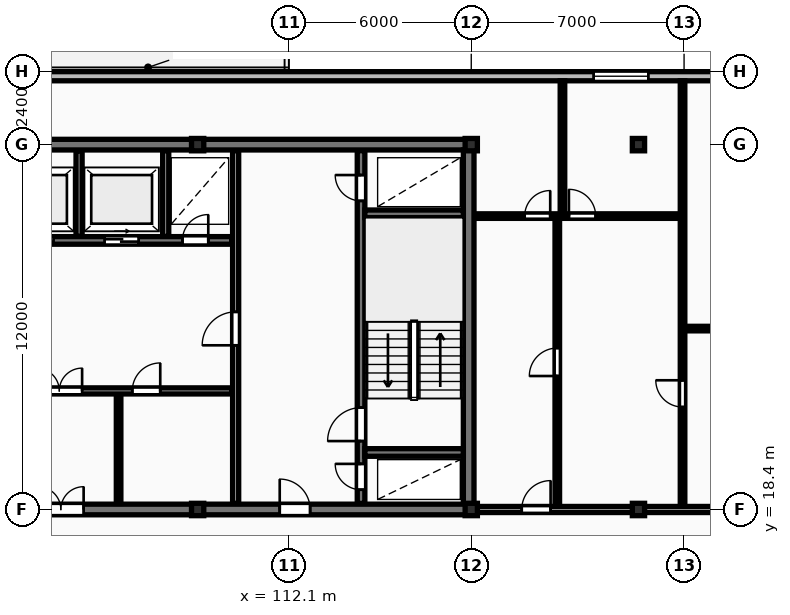
"""IFC4 building model, lengths in metres.
Left out: names, types, materials, properties, quantities, classifications, styles, units other than length and angle.
Written with IfcOpenShell. Run it as: python <this file> out.ifc"""

import sys

from ifc_helpers import new_model, si_unit, direction, frame, frame_2d, origin, origin_2d, place, context, subcontext, project, spatial, rectangle, i_section, extrude, element, fill, save


model = new_model("IFC4")
c1 = context("Model", 3, precision=1e-05, world=origin(), true_north=direction((0.0, 1.0)))
c2 = subcontext(c1, "Body", "Model", "MODEL_VIEW")
j1 = project(units=[si_unit("LENGTHUNIT", "METRE"), si_unit("PLANEANGLEUNIT", "RADIAN")], contexts=[c1])
p1 = place(None, origin())
s1 = spatial("IfcSite", under=j1, at=p1, CompositionType="ELEMENT")
p2 = place(p1, origin())
s2 = spatial("IfcBuilding", under=s1, at=p2, CompositionType="ELEMENT")
p3 = place(p2, frame((0.0, 0.0, 153.7)))
s3 = spatial("IfcBuildingStorey", under=s2, at=p3, CompositionType="ELEMENT", Elevation=153.7)
for number, where, z_axis, x_axis in (
    (1, (109.1, 18.4, 0.0), (0.0, 0.0, 1.0), (1.0, 0.0, 0.0)),
    (2, (109.1, 30.4, 0.0), (0.0, 0.0, 1.0), (1.0, 0.0, 0.0)),
    (3, (118.1, 18.4, 0.0), (0.0, 0.0, 1.0), (1.0, 0.0, 0.0)),
    (4, (118.1, 30.4, 0.0), (0.0, 0.0, 1.0), (1.0, 0.0, 0.0)),
    (5, (123.6, 18.4, 0.0), (0.0, 0.0, 1.0), (1.0, 0.0, 0.0)),
    (6, (123.6, 30.4, 0.0), (0.0, 0.0, 1.0), (1.0, 0.0, 0.0)),
):
    element("IfcColumn", number, at=place(p3, frame(where, z_axis=z_axis, x_axis=x_axis)), inside=s3, PredefinedType="COLUMN", context=c2, shape_type="SweptSolid", body=[
        extrude(i_section(OverallWidth=0.403, OverallDepth=0.406, WebThickness=0.027, FlangeThickness=0.043, FilletRadius=0.015, at=origin_2d()), origin(), (0.0, 0.0, 1.0), 3.6),
    ])
p4 = place(p3, frame((130.7, 32.65, 0.0), z_axis=(0.0, 0.0, 1.0), x_axis=(-1.0, 0.0, 0.0)))
e7 = element("IfcWall", 7, at=p4, inside=s3, PredefinedType="STANDARD", context=c2, shape_type="SweptSolid", body=[
    extrude(rectangle(XDim=58.0, YDim=0.3, at=frame_2d((29.0, 0.0))), origin(), (0.0, 0.0, 1.0), 3.32),
])
p5 = place(p4, frame((50.125, 0.0, 0.85)))
e8 = element("IfcOpeningElement", 8, at=p5, cuts=e7, PredefinedType="OPENING", context=c2, shape_type="SweptSolid", body=[
    extrude(rectangle(XDim=1.8, YDim=1.8, at=frame_2d((0.9, 0.9))), frame((0.0, 0.16, 0.0), z_axis=(0.0, -1.0, 0.0), x_axis=(1.0, 0.0, 0.0)), (0.0, 0.0, 1.0), 0.32),
])
p6 = place(p4, frame((6.775, 0.0, 0.85)))
e9 = element("IfcOpeningElement", 9, at=p6, cuts=e7, PredefinedType="OPENING", context=c2, shape_type="SweptSolid", body=[
    extrude(rectangle(XDim=1.8, YDim=1.8, at=frame_2d((0.9, 0.9))), frame((0.0, 0.16, 0.0), z_axis=(0.0, -1.0, 0.0), x_axis=(1.0, 0.0, 0.0)), (0.0, 0.0, 1.0), 0.32),
])
p7 = place(p4, frame((38.0, 0.0, 0.0)))
e10 = element("IfcOpeningElement", 10, at=p7, cuts=e7, PredefinedType="OPENING", context=c2, shape_type="SweptSolid", body=[
    extrude(rectangle(XDim=1.1, YDim=2.1, at=frame_2d((0.55, 1.05))), frame((0.0, 0.16, 0.0), z_axis=(0.0, -1.0, 0.0), x_axis=(1.0, 0.0, 0.0)), (0.0, 0.0, 1.0), 0.32),
])
p8 = place(p3, frame((81.925, 30.4, 0.0), z_axis=(0.0, 0.0, 1.0), x_axis=(1.0, 0.0, 0.0)))
e11 = element("IfcWall", 11, at=p8, inside=s3, PredefinedType="SHEAR", context=c2, shape_type="SweptSolid", body=[
    extrude(rectangle(XDim=36.265, YDim=0.35, at=frame_2d((18.132, 0.0))), origin(), (0.0, 0.0, 1.0), 3.6),
])
p9 = place(p8, frame((9.675, 0.0, 0.0)))
e12 = element("IfcOpeningElement", 12, at=p9, cuts=e11, PredefinedType="OPENING", context=c2, shape_type="SweptSolid", body=[
    extrude(rectangle(XDim=1.1, YDim=2.1, at=frame_2d((0.55, 1.05))), frame((0.0, 0.185, 0.0), z_axis=(0.0, -1.0, 0.0), x_axis=(1.0, 0.0, 0.0)), (0.0, 0.0, 1.0), 0.37),
])
p10 = place(p3, frame((118.015, 18.575, 0.0), z_axis=(0.0, 0.0, 1.0), x_axis=(0.0, 1.0, 0.0)))
e13 = element("IfcWall", 13, at=p10, inside=s3, PredefinedType="SHEAR", context=c2, shape_type="SweptSolid", body=[
    extrude(rectangle(XDim=11.65, YDim=0.35, at=frame_2d((5.825, 0.0))), origin(), (0.0, 0.0, 1.0), 3.6),
])
p11 = place(p3, frame((81.925, 18.4, 0.0), z_axis=(0.0, 0.0, 1.0), x_axis=(1.0, 0.0, 0.0)))
e14 = element("IfcWall", 14, at=p11, inside=s3, PredefinedType="SHEAR", context=c2, shape_type="SweptSolid", body=[
    extrude(rectangle(XDim=36.265, YDim=0.35, at=frame_2d((18.132, 0.0))), origin(), (0.0, 0.0, 1.0), 3.6),
])
p12 = place(p11, frame((5.675, 0.0, 0.0)))
e15 = element("IfcOpeningElement", 15, at=p12, cuts=e14, PredefinedType="OPENING", context=c2, shape_type="SweptSolid", body=[
    extrude(rectangle(XDim=1.0, YDim=2.15, at=frame_2d((0.5, 1.075))), frame((0.0, 0.185, 0.0), z_axis=(0.0, -1.0, 0.0), x_axis=(1.0, 0.0, 0.0)), (0.0, 0.0, 1.0), 0.37),
])
p13 = place(p11, frame((21.925, 0.0, 0.0)))
e16 = element("IfcOpeningElement", 16, at=p13, cuts=e14, PredefinedType="OPENING", context=c2, shape_type="SweptSolid", body=[
    extrude(rectangle(XDim=1.5, YDim=2.2, at=frame_2d((0.75, 1.1))), frame((0.0, 0.185, 0.0), z_axis=(0.0, -1.0, 0.0), x_axis=(1.0, 0.0, 0.0)), (0.0, 0.0, 1.0), 0.37),
])
p14 = place(p11, frame((29.875, 0.0, 0.0)))
e17 = element("IfcOpeningElement", 17, at=p14, cuts=e14, PredefinedType="OPENING", context=c2, shape_type="SweptSolid", body=[
    extrude(rectangle(XDim=1.0, YDim=2.15, at=frame_2d((0.5, 1.075))), frame((0.0, 0.185, 0.0), z_axis=(0.0, -1.0, 0.0), x_axis=(1.0, 0.0, 0.0)), (0.0, 0.0, 1.0), 0.37),
])
for number, where, z_axis, x_axis in (
    (18, (105.2, 27.38, 0.0), (0.0, 0.0, 1.0), (0.0, 1.0, 0.0)),
    (19, (108.05, 27.38, 0.0), (0.0, 0.0, 1.0), (0.0, 1.0, 0.0)),
):
    element("IfcWall", number, at=place(p3, frame(where, z_axis=z_axis, x_axis=x_axis)), inside=s3, PredefinedType="PARTITIONING", context=c2, shape_type="SweptSolid", body=[
        extrude(rectangle(XDim=2.82, YDim=0.2, at=frame_2d((1.41, 0.0))), origin(), (0.0, 0.0, 1.0), 3.32),
    ])
p15 = place(p3, frame((99.68, 27.25, 0.0), z_axis=(0.0, 0.0, 1.0), x_axis=(1.0, 0.0, 0.0)))
e20 = element("IfcWall", 20, at=p15, inside=s3, PredefinedType="SHEAR", context=c2, shape_type="SweptSolid", body=[
    extrude(rectangle(XDim=10.54, YDim=0.25, at=frame_2d((5.27, 0.0))), origin(), (0.0, 0.0, 1.0), 3.6),
])
p16 = place(p15, frame((0.76, 0.0, 0.0)))
e21 = element("IfcOpeningElement", 21, at=p16, cuts=e20, PredefinedType="OPENING", context=c2, shape_type="SweptSolid", body=[
    extrude(rectangle(XDim=1.12, YDim=2.12, at=frame_2d((0.56, 1.06))), frame((0.0, 0.135, 0.0), z_axis=(0.0, -1.0, 0.0), x_axis=(1.0, 0.0, 0.0)), (0.0, 0.0, 1.0), 0.27),
])
p17 = place(p15, frame((3.56, 0.0, 0.0)))
e22 = element("IfcOpeningElement", 22, at=p17, cuts=e20, PredefinedType="OPENING", context=c2, shape_type="SweptSolid", body=[
    extrude(rectangle(XDim=1.12, YDim=2.12, at=frame_2d((0.56, 1.06))), frame((0.0, 0.135, 0.0), z_axis=(0.0, -1.0, 0.0), x_axis=(1.0, 0.0, 0.0)), (0.0, 0.0, 1.0), 0.27),
])
p18 = place(p15, frame((6.36, 0.0, 0.0)))
e23 = element("IfcOpeningElement", 23, at=p18, cuts=e20, PredefinedType="OPENING", context=c2, shape_type="SweptSolid", body=[
    extrude(rectangle(XDim=1.12, YDim=2.12, at=frame_2d((0.56, 1.06))), frame((0.0, 0.135, 0.0), z_axis=(0.0, -1.0, 0.0), x_axis=(1.0, 0.0, 0.0)), (0.0, 0.0, 1.0), 0.27),
])
p19 = place(p15, frame((8.92, 0.0, 0.0)))
e24 = element("IfcOpeningElement", 24, at=p19, cuts=e20, PredefinedType="OPENING", context=c2, shape_type="SweptSolid", body=[
    extrude(rectangle(XDim=0.85, YDim=2.05, at=frame_2d((0.425, 1.025))), frame((0.0, 0.135, 0.0), z_axis=(0.0, -1.0, 0.0), x_axis=(1.0, 0.0, 0.0)), (0.0, 0.0, 1.0), 0.27),
])
p20 = place(p3, frame((106.5, 18.6, 0.0), z_axis=(0.0, 0.0, 1.0), x_axis=(0.0, 1.0, 0.0)))
e25 = element("IfcWall", 25, at=p20, inside=s3, PredefinedType="PARTITIONING", context=c2, shape_type="SweptSolid", body=[
    extrude(rectangle(XDim=3.6, YDim=0.15, at=frame_2d((1.8, 0.0))), origin(), (0.0, 0.0, 1.0), 3.32),
])
p21 = place(p3, frame((91.08, 22.3, 0.0), z_axis=(0.0, 0.0, 1.0), x_axis=(1.0, 0.0, 0.0)))
e26 = element("IfcWall", 26, at=p21, inside=s3, PredefinedType="PARTITIONING", context=c2, shape_type="SweptSolid", body=[
    extrude(rectangle(XDim=19.14, YDim=0.2, at=frame_2d((9.57, 0.0))), origin(), (0.0, 0.0, 1.0), 3.32),
])
p22 = place(p21, frame((1.15, 0.0, 0.0)))
e27 = element("IfcOpeningElement", 27, at=p22, cuts=e26, PredefinedType="OPENING", context=c2, shape_type="SweptSolid", body=[
    extrude(rectangle(XDim=0.85, YDim=2.05, at=frame_2d((0.425, 1.025))), frame((0.0, 0.11, 0.0), z_axis=(0.0, -1.0, 0.0), x_axis=(1.0, 0.0, 0.0)), (0.0, 0.0, 1.0), 0.22),
])
p23 = place(p21, frame((3.2, 0.0, 0.0)))
e28 = element("IfcOpeningElement", 28, at=p23, cuts=e26, PredefinedType="OPENING", context=c2, shape_type="SweptSolid", body=[
    extrude(rectangle(XDim=0.85, YDim=2.05, at=frame_2d((0.425, 1.025))), frame((0.0, 0.11, 0.0), z_axis=(0.0, -1.0, 0.0), x_axis=(1.0, 0.0, 0.0)), (0.0, 0.0, 1.0), 0.22),
])
p24 = place(p21, frame((12.72, 0.0, 0.0)))
e29 = element("IfcOpeningElement", 29, at=p24, cuts=e26, PredefinedType="OPENING", context=c2, shape_type="SweptSolid", body=[
    extrude(rectangle(XDim=1.5, YDim=2.2, at=frame_2d((0.75, 1.1))), frame((0.0, 0.11, 0.0), z_axis=(0.0, -1.0, 0.0), x_axis=(1.0, 0.0, 0.0)), (0.0, 0.0, 1.0), 0.22),
])
p25 = place(p21, frame((6.42, 0.0, 0.0)))
e30 = element("IfcOpeningElement", 30, at=p25, cuts=e26, PredefinedType="OPENING", context=c2, shape_type="SweptSolid", body=[
    extrude(rectangle(XDim=0.92, YDim=2.08, at=frame_2d((0.46, 1.04))), frame((0.0, 0.11, 0.0), z_axis=(0.0, -1.0, 0.0), x_axis=(1.0, 0.0, 0.0)), (0.0, 0.0, 1.0), 0.22),
])
p26 = place(p21, frame((15.87, 0.0, 0.0)))
e31 = element("IfcOpeningElement", 31, at=p26, cuts=e26, PredefinedType="OPENING", context=c2, shape_type="SweptSolid", body=[
    extrude(rectangle(XDim=0.92, YDim=2.08, at=frame_2d((0.46, 1.04))), frame((0.0, 0.11, 0.0), z_axis=(0.0, -1.0, 0.0), x_axis=(1.0, 0.0, 0.0)), (0.0, 0.0, 1.0), 0.22),
])
p27 = place(p3, frame((110.35, 18.6, 0.0), z_axis=(0.0, 0.0, 1.0), x_axis=(0.0, 1.0, 0.0)))
e32 = element("IfcWall", 32, at=p27, inside=s3, PredefinedType="PARTITIONING", context=c2, shape_type="SweptSolid", body=[
    extrude(rectangle(XDim=11.6, YDim=0.2, at=frame_2d((5.8, 0.0))), origin(), (0.0, 0.0, 1.0), 3.32),
])
p28 = place(p27, frame((5.2, 0.0, 0.0)))
e33 = element("IfcOpeningElement", 33, at=p28, cuts=e32, PredefinedType="OPENING", context=c2, shape_type="SweptSolid", body=[
    extrude(rectangle(XDim=1.1, YDim=2.15, at=frame_2d((0.55, 1.075))), frame((0.0, 0.11, 0.0), z_axis=(0.0, -1.0, 0.0), x_axis=(1.0, 0.0, 0.0)), (0.0, 0.0, 1.0), 0.22),
])
p29 = place(p3, frame((114.475, 18.6, 0.0), z_axis=(0.0, 0.0, 1.0), x_axis=(0.0, 1.0, 0.0)))
e34 = element("IfcWall", 34, at=p29, inside=s3, PredefinedType="SHEAR", context=c2, shape_type="SweptSolid", body=[
    extrude(rectangle(XDim=11.6, YDim=0.25, at=frame_2d((5.8, 0.0))), origin(), (0.0, 0.0, 1.0), 3.6),
])
p30 = place(p29, frame((0.45, 0.0, 0.0)))
e35 = element("IfcOpeningElement", 35, at=p30, cuts=e34, PredefinedType="OPENING", context=c2, shape_type="SweptSolid", body=[
    extrude(rectangle(XDim=0.85, YDim=2.05, at=frame_2d((0.425, 1.025))), frame((0.0, 0.135, 0.0), z_axis=(0.0, -1.0, 0.0), x_axis=(1.0, 0.0, 0.0)), (0.0, 0.0, 1.0), 0.27),
])
p31 = place(p29, frame((2.05, 0.0, 0.0)))
e36 = element("IfcOpeningElement", 36, at=p31, cuts=e34, PredefinedType="OPENING", context=c2, shape_type="SweptSolid", body=[
    extrude(rectangle(XDim=1.1, YDim=2.1, at=frame_2d((0.55, 1.05))), frame((0.0, 0.135, 0.0), z_axis=(0.0, -1.0, 0.0), x_axis=(1.0, 0.0, 0.0)), (0.0, 0.0, 1.0), 0.27),
])
p32 = place(p29, frame((9.95, 0.0, 0.0)))
e37 = element("IfcOpeningElement", 37, at=p32, cuts=e34, PredefinedType="OPENING", context=c2, shape_type="SweptSolid", body=[
    extrude(rectangle(XDim=0.85, YDim=2.05, at=frame_2d((0.425, 1.025))), frame((0.0, 0.135, 0.0), z_axis=(0.0, -1.0, 0.0), x_axis=(1.0, 0.0, 0.0)), (0.0, 0.0, 1.0), 0.27),
])
for number, where, z_axis, x_axis in (
    (38, (114.6, 20.275, 0.0), (0.0, 0.0, 1.0), (1.0, 0.0, 0.0)),
    (39, (114.6, 28.125, 0.0), (0.0, 0.0, 1.0), (1.0, 0.0, 0.0)),
):
    element("IfcWall", number, at=place(p3, frame(where, z_axis=z_axis, x_axis=x_axis)), inside=s3, PredefinedType="SHEAR", context=c2, shape_type="SweptSolid", body=[
        extrude(rectangle(XDim=3.24, YDim=0.25, at=frame_2d((1.62, 0.0))), origin(), (0.0, 0.0, 1.0), 3.6),
    ])
p33 = place(p3, frame((125.05, 24.35, 0.0), z_axis=(0.0, 0.0, 1.0), x_axis=(1.0, 0.0, 0.0)))
e40 = element("IfcWall", 40, at=p33, inside=s3, PredefinedType="PARTITIONING", context=c2, shape_type="SweptSolid", body=[
    extrude(rectangle(XDim=5.65, YDim=0.15, at=frame_2d((2.825, 0.0))), origin(), (0.0, 0.0, 1.0), 3.32),
])
p34 = place(p33, frame((2.405, 0.0, 0.0)))
e41 = element("IfcOpeningElement", 41, at=p34, cuts=e40, PredefinedType="OPENING", context=c2, shape_type="SweptSolid", body=[
    extrude(rectangle(XDim=0.84, YDim=2.04, at=frame_2d((0.42, 1.02))), frame((0.0, 0.085, 0.0), z_axis=(0.0, -1.0, 0.0), x_axis=(1.0, 0.0, 0.0)), (0.0, 0.0, 1.0), 0.17),
])
p35 = place(p3, frame((125.05, 18.45, 0.0), z_axis=(0.0, 0.0, 1.0), x_axis=(0.0, 1.0, 0.0)))
e42 = element("IfcWall", 42, at=p35, inside=s3, PredefinedType="PARTITIONING", context=c2, shape_type="SweptSolid", body=[
    extrude(rectangle(XDim=14.05, YDim=0.15, at=frame_2d((7.025, 0.0))), origin(), (0.0, 0.0, 1.0), 3.32),
])
p36 = place(p35, frame((3.32, 0.0, 0.0)))
e43 = element("IfcOpeningElement", 43, at=p36, cuts=e42, PredefinedType="OPENING", context=c2, shape_type="SweptSolid", body=[
    extrude(rectangle(XDim=0.88, YDim=2.06, at=frame_2d((0.44, 1.03))), frame((0.0, 0.085, 0.0), z_axis=(0.0, -1.0, 0.0), x_axis=(1.0, 0.0, 0.0)), (0.0, 0.0, 1.0), 0.17),
])
p37 = place(p3, frame((120.93, 18.45, 0.0), z_axis=(0.0, 0.0, 1.0), x_axis=(0.0, 1.0, 0.0)))
e44 = element("IfcWall", 44, at=p37, inside=s3, PredefinedType="PARTITIONING", context=c2, shape_type="SweptSolid", body=[
    extrude(rectangle(XDim=9.6, YDim=0.15, at=frame_2d((4.8, 0.0))), origin(), (0.0, 0.0, 1.0), 3.32),
])
p38 = place(p37, frame((4.34, 0.0, 0.0)))
e45 = element("IfcOpeningElement", 45, at=p38, cuts=e44, PredefinedType="OPENING", context=c2, shape_type="SweptSolid", body=[
    extrude(rectangle(XDim=0.92, YDim=2.08, at=frame_2d((0.46, 1.04))), frame((0.0, 0.085, 0.0), z_axis=(0.0, -1.0, 0.0), x_axis=(1.0, 0.0, 0.0)), (0.0, 0.0, 1.0), 0.17),
])
p39 = place(p3, frame((121.1, 28.05, 0.0), z_axis=(0.0, 0.0, 1.0), x_axis=(0.0, 1.0, 0.0)))
e46 = element("IfcWall", 46, at=p39, inside=s3, PredefinedType="PARTITIONING", context=c2, shape_type="SweptSolid", body=[
    extrude(rectangle(XDim=4.45, YDim=0.15, at=frame_2d((2.225, 0.0))), origin(), (0.0, 0.0, 1.0), 3.32),
])
p40 = place(p3, frame((118.27, 28.05, 0.0), z_axis=(0.0, 0.0, 1.0), x_axis=(1.0, 0.0, 0.0)))
e47 = element("IfcWall", 47, at=p40, inside=s3, PredefinedType="PARTITIONING", context=c2, shape_type="SweptSolid", body=[
    extrude(rectangle(XDim=6.76, YDim=0.15, at=frame_2d((3.38, 0.0))), origin(), (0.0, 0.0, 1.0), 3.32),
])
p41 = place(p40, frame((1.587, 0.0, 0.0)))
e48 = element("IfcOpeningElement", 48, at=p41, cuts=e47, PredefinedType="OPENING", context=c2, shape_type="SweptSolid", body=[
    extrude(rectangle(XDim=0.84, YDim=2.04, at=frame_2d((0.42, 1.02))), frame((0.0, 0.085, 0.0), z_axis=(0.0, -1.0, 0.0), x_axis=(1.0, 0.0, 0.0)), (0.0, 0.0, 1.0), 0.17),
])
p42 = place(p40, frame((3.042, 0.0, 0.0)))
e49 = element("IfcOpeningElement", 49, at=p42, cuts=e47, PredefinedType="OPENING", context=c2, shape_type="SweptSolid", body=[
    extrude(rectangle(XDim=0.88, YDim=2.06, at=frame_2d((0.44, 1.03))), frame((0.0, 0.085, 0.0), z_axis=(0.0, -1.0, 0.0), x_axis=(1.0, 0.0, 0.0)), (0.0, 0.0, 1.0), 0.17),
])
p43 = place(p3, frame((118.25, 18.4, 0.0), z_axis=(0.0, 0.0, 1.0), x_axis=(1.0, 0.0, 0.0)))
e50 = element("IfcWall", 50, at=p43, inside=s3, PredefinedType="PARTITIONING", context=c2, shape_type="SweptSolid", body=[
    extrude(rectangle(XDim=12.45, YDim=0.2, at=frame_2d((6.225, 0.0))), origin(), (0.0, 0.0, 1.0), 2.708),
])
p44 = place(p43, frame((1.51, 0.0, 0.0)))
e51 = element("IfcOpeningElement", 51, at=p44, cuts=e50, PredefinedType="OPENING", context=c2, shape_type="SweptSolid", body=[
    extrude(rectangle(XDim=0.95, YDim=2.15, at=frame_2d((0.475, 1.075))), frame((0.0, 0.11, 0.0), z_axis=(0.0, -1.0, 0.0), x_axis=(1.0, 0.0, 0.0)), (0.0, 0.0, 1.0), 0.22),
])
p45 = place(p6, origin())
e52 = element("IfcWindow", 52, at=p45, inside=s3, PartitioningType="SINGLE_PANEL", PredefinedType="WINDOW", context=c2, shape_type="SweptSolid", body=[
    extrude(rectangle(XDim=1.8, YDim=1.8, at=frame_2d((0.9, 0.9))), frame((0.0, 0.03, 0.0), z_axis=(0.0, -1.0, 0.0), x_axis=(1.0, 0.0, 0.0)), (0.0, 0.0, 1.0), 0.06),
])
fill(e9, e52)
p46 = place(p13, origin())
e53 = element("IfcDoor", 53, at=p46, inside=s3, OperationType="DOUBLE_DOOR_SINGLE_SWING", PredefinedType="DOOR", context=c2, shape_type="SweptSolid", body=[
    extrude(rectangle(XDim=1.5, YDim=2.2, at=frame_2d((0.75, 1.1))), frame((0.0, 0.025, 0.0), z_axis=(0.0, -1.0, 0.0), x_axis=(1.0, 0.0, 0.0)), (0.0, 0.0, 1.0), 0.05),
])
fill(e16, e53)
p47 = place(p14, origin())
e54 = element("IfcDoor", 54, at=p47, inside=s3, OperationType="SINGLE_SWING_LEFT", PredefinedType="DOOR", context=c2, shape_type="SweptSolid", body=[
    extrude(rectangle(XDim=1.0, YDim=2.15, at=frame_2d((0.5, 1.075))), frame((0.0, 0.025, 0.0), z_axis=(0.0, -1.0, 0.0), x_axis=(1.0, 0.0, 0.0)), (0.0, 0.0, 1.0), 0.05),
])
fill(e17, e54)
p48 = place(p17, origin())
e55 = element("IfcDoor", 55, at=p48, inside=s3, OperationType="SLIDING_TO_RIGHT", PredefinedType="DOOR", context=c2, shape_type="SweptSolid", body=[
    extrude(rectangle(XDim=1.12, YDim=2.12, at=frame_2d((0.56, 1.06))), frame((0.0, 0.025, 0.0), z_axis=(0.0, -1.0, 0.0), x_axis=(1.0, 0.0, 0.0)), (0.0, 0.0, 1.0), 0.05),
])
fill(e22, e55)
p49 = place(p18, origin())
e56 = element("IfcDoor", 56, at=p49, inside=s3, OperationType="SLIDING_TO_RIGHT", PredefinedType="DOOR", context=c2, shape_type="SweptSolid", body=[
    extrude(rectangle(XDim=1.12, YDim=2.12, at=frame_2d((0.56, 1.06))), frame((0.0, 0.025, 0.0), z_axis=(0.0, -1.0, 0.0), x_axis=(1.0, 0.0, 0.0)), (0.0, 0.0, 1.0), 0.05),
])
fill(e23, e56)
p50 = place(p19, origin())
e57 = element("IfcDoor", 57, at=p50, inside=s3, OperationType="SINGLE_SWING_RIGHT", PredefinedType="DOOR", context=c2, shape_type="SweptSolid", body=[
    extrude(rectangle(XDim=0.85, YDim=2.05, at=frame_2d((0.425, 1.025))), frame((0.0, 0.025, 0.0), z_axis=(0.0, -1.0, 0.0), x_axis=(1.0, 0.0, 0.0)), (0.0, 0.0, 1.0), 0.05),
])
fill(e24, e57)
p51 = place(p24, origin())
e58 = element("IfcDoor", 58, at=p51, inside=s3, OperationType="DOUBLE_DOOR_SINGLE_SWING", PredefinedType="DOOR", context=c2, shape_type="SweptSolid", body=[
    extrude(rectangle(XDim=1.5, YDim=2.2, at=frame_2d((0.75, 1.1))), frame((0.0, 0.025, 0.0), z_axis=(0.0, -1.0, 0.0), x_axis=(1.0, 0.0, 0.0)), (0.0, 0.0, 1.0), 0.05),
])
fill(e29, e58)
p52 = place(p26, origin())
e59 = element("IfcDoor", 59, at=p52, inside=s3, OperationType="SINGLE_SWING_RIGHT", PredefinedType="DOOR", context=c2, shape_type="SweptSolid", body=[
    extrude(rectangle(XDim=0.92, YDim=2.08, at=frame_2d((0.46, 1.04))), frame((0.0, 0.025, 0.0), z_axis=(0.0, -1.0, 0.0), x_axis=(1.0, 0.0, 0.0)), (0.0, 0.0, 1.0), 0.05),
])
fill(e31, e59)
p53 = place(p28, origin())
e60 = element("IfcDoor", 60, at=p53, inside=s3, OperationType="SINGLE_SWING_LEFT", PredefinedType="DOOR", context=c2, shape_type="SweptSolid", body=[
    extrude(rectangle(XDim=1.1, YDim=2.15, at=frame_2d((0.55, 1.075))), frame((0.0, 0.025, 0.0), z_axis=(0.0, -1.0, 0.0), x_axis=(1.0, 0.0, 0.0)), (0.0, 0.0, 1.0), 0.05),
])
fill(e33, e60)
p54 = place(p30, origin())
e61 = element("IfcDoor", 61, at=p54, inside=s3, OperationType="SINGLE_SWING_RIGHT", PredefinedType="DOOR", context=c2, shape_type="SweptSolid", body=[
    extrude(rectangle(XDim=0.85, YDim=2.05, at=frame_2d((0.425, 1.025))), frame((0.0, 0.025, 0.0), z_axis=(0.0, -1.0, 0.0), x_axis=(1.0, 0.0, 0.0)), (0.0, 0.0, 1.0), 0.05),
])
fill(e35, e61)
p55 = place(p31, origin())
e62 = element("IfcDoor", 62, at=p55, inside=s3, OperationType="SINGLE_SWING_LEFT", PredefinedType="DOOR", context=c2, shape_type="SweptSolid", body=[
    extrude(rectangle(XDim=1.1, YDim=2.1, at=frame_2d((0.55, 1.05))), frame((0.0, 0.025, 0.0), z_axis=(0.0, -1.0, 0.0), x_axis=(1.0, 0.0, 0.0)), (0.0, 0.0, 1.0), 0.05),
])
fill(e36, e62)
p56 = place(p32, origin())
e63 = element("IfcDoor", 63, at=p56, inside=s3, OperationType="SINGLE_SWING_RIGHT", PredefinedType="DOOR", context=c2, shape_type="SweptSolid", body=[
    extrude(rectangle(XDim=0.85, YDim=2.05, at=frame_2d((0.425, 1.025))), frame((0.0, 0.025, 0.0), z_axis=(0.0, -1.0, 0.0), x_axis=(1.0, 0.0, 0.0)), (0.0, 0.0, 1.0), 0.05),
])
fill(e37, e63)
p57 = place(p36, origin())
e64 = element("IfcDoor", 64, at=p57, inside=s3, OperationType="SINGLE_SWING_RIGHT", PredefinedType="DOOR", context=c2, shape_type="SweptSolid", body=[
    extrude(rectangle(XDim=0.88, YDim=2.06, at=frame_2d((0.44, 1.03))), frame((0.0, 0.025, 0.0), z_axis=(0.0, -1.0, 0.0), x_axis=(1.0, 0.0, 0.0)), (0.0, 0.0, 1.0), 0.05),
])
fill(e43, e64)
p58 = place(p38, origin())
e65 = element("IfcDoor", 65, at=p58, inside=s3, OperationType="SINGLE_SWING_LEFT", PredefinedType="DOOR", context=c2, shape_type="SweptSolid", body=[
    extrude(rectangle(XDim=0.92, YDim=2.08, at=frame_2d((0.46, 1.04))), frame((0.0, 0.025, 0.0), z_axis=(0.0, -1.0, 0.0), x_axis=(1.0, 0.0, 0.0)), (0.0, 0.0, 1.0), 0.05),
])
fill(e45, e65)
p59 = place(p41, origin())
e66 = element("IfcDoor", 66, at=p59, inside=s3, OperationType="SINGLE_SWING_RIGHT", PredefinedType="DOOR", context=c2, shape_type="SweptSolid", body=[
    extrude(rectangle(XDim=0.84, YDim=2.04, at=frame_2d((0.42, 1.02))), frame((0.0, 0.025, 0.0), z_axis=(0.0, -1.0, 0.0), x_axis=(1.0, 0.0, 0.0)), (0.0, 0.0, 1.0), 0.05),
])
fill(e48, e66)
p60 = place(p42, origin())
e67 = element("IfcDoor", 67, at=p60, inside=s3, OperationType="SINGLE_SWING_LEFT", PredefinedType="DOOR", context=c2, shape_type="SweptSolid", body=[
    extrude(rectangle(XDim=0.88, YDim=2.06, at=frame_2d((0.44, 1.03))), frame((0.0, 0.025, 0.0), z_axis=(0.0, -1.0, 0.0), x_axis=(1.0, 0.0, 0.0)), (0.0, 0.0, 1.0), 0.05),
])
fill(e49, e67)
p61 = place(p44, origin())
e68 = element("IfcDoor", 68, at=p61, inside=s3, OperationType="SINGLE_SWING_RIGHT", PredefinedType="DOOR", context=c2, shape_type="SweptSolid", body=[
    extrude(rectangle(XDim=0.95, YDim=2.15, at=frame_2d((0.475, 1.075))), frame((0.0, 0.025, 0.0), z_axis=(0.0, -1.0, 0.0), x_axis=(1.0, 0.0, 0.0)), (0.0, 0.0, 1.0), 0.05),
])
fill(e51, e68)
save(model, sys.argv[1])
